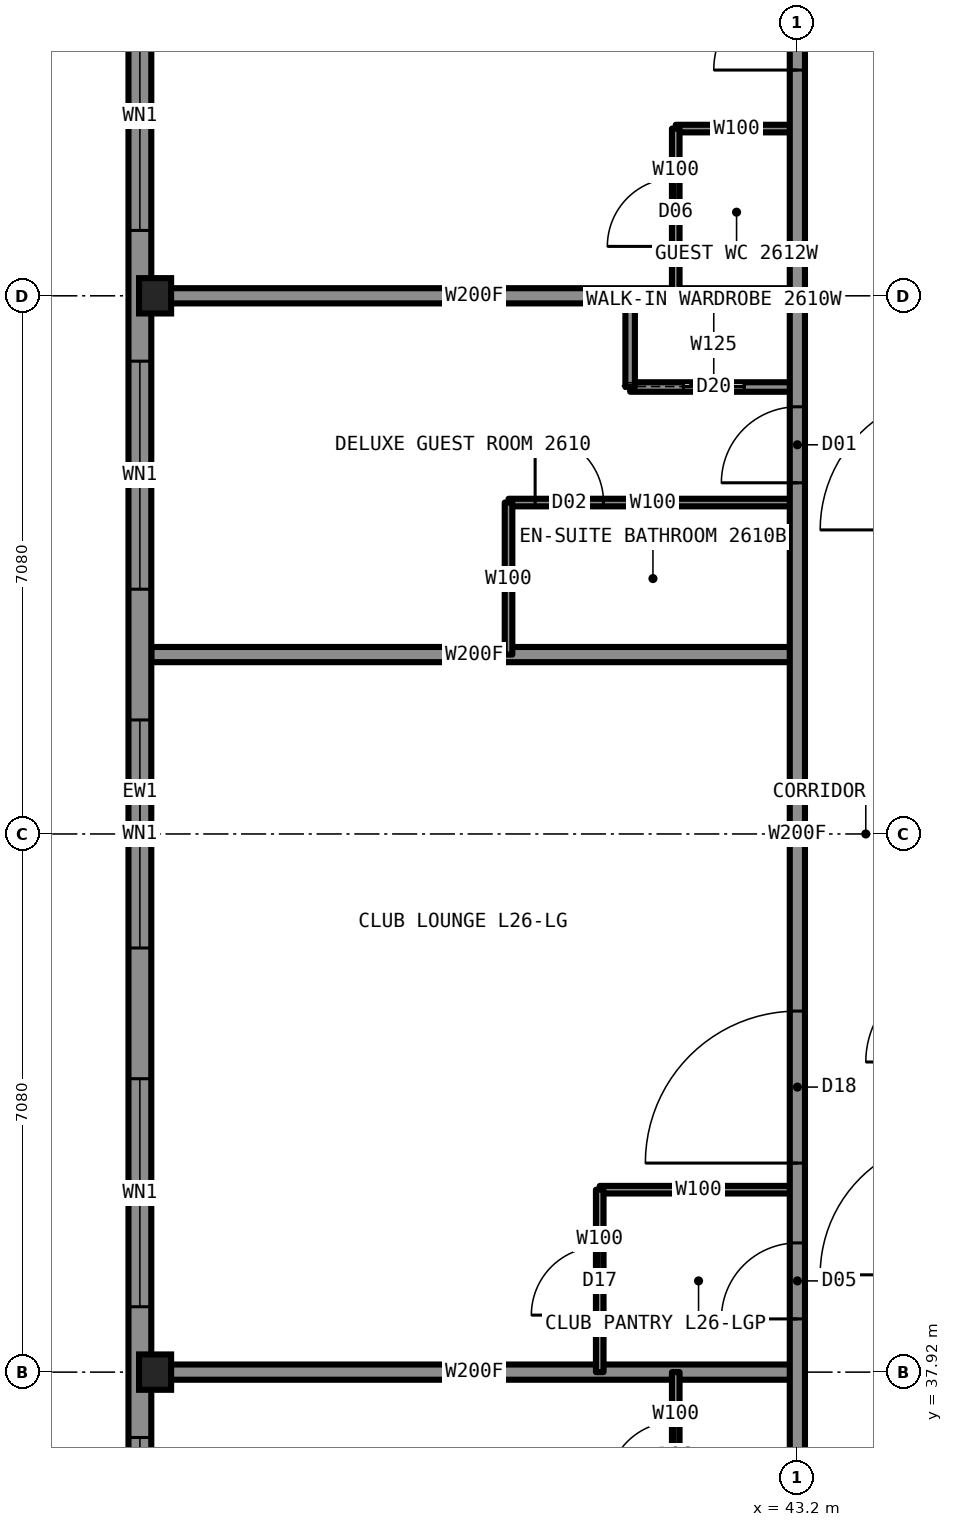
"""IFC4 building model, lengths in metres.
Left out: names, types, materials, properties, quantities, classifications, styles, units other than length and angle.
Written with IfcOpenShell. Run it as: python <this file> out.ifc"""

import sys

from ifc_helpers import new_model, si_unit, direction, frame, frame_2d, origin, origin_2d, place, context, subcontext, project, spatial, rectangle, i_section, extrude, element, fill, save


model = new_model("IFC4")
c1 = context("Model", 3, precision=1e-05, world=origin(), true_north=direction((0.0, 1.0)))
c2 = subcontext(c1, "Body", "Model", "MODEL_VIEW")
j1 = project(units=[si_unit("LENGTHUNIT", "METRE"), si_unit("PLANEANGLEUNIT", "RADIAN")], contexts=[c1])
p1 = place(None, origin())
s1 = spatial("IfcSite", under=j1, at=p1, CompositionType="ELEMENT")
p2 = place(p1, origin())
s2 = spatial("IfcBuilding", under=s1, at=p2, CompositionType="ELEMENT")
p3 = place(p2, frame((0.0, 0.0, 93.4)))
s3 = spatial("IfcBuildingStorey", under=s2, at=p3, CompositionType="ELEMENT", Elevation=93.4)
for number, where, z_axis, x_axis in (
    (1, (34.75, 37.92, 0.0), (0.0, 0.0, 1.0), (1.0, 0.0, 0.0)),
    (2, (34.75, 52.08, 0.0), (0.0, 0.0, 1.0), (1.0, 0.0, 0.0)),
):
    element("IfcColumn", number, at=place(p3, frame(where, z_axis=z_axis, x_axis=x_axis)), inside=s3, PredefinedType="COLUMN", context=c2, shape_type="SweptSolid", body=[
        extrude(i_section(OverallWidth=0.442, OverallDepth=0.531, WebThickness=0.066, FlangeThickness=0.106, at=origin_2d()), origin(), (0.0, 0.0, 1.0), 3.5),
    ])
p4 = place(p3, frame((40.6, 40.32, 0.0), z_axis=(0.0, 0.0, 1.0), x_axis=(1.0, 0.0, 0.0)))
e3 = element("IfcWall", 3, at=p4, inside=s3, PredefinedType="PARTITIONING", context=c2, shape_type="SweptSolid", body=[
    extrude(rectangle(XDim=2.6, YDim=0.1, at=frame_2d((1.3, 0.0))), origin(), (0.0, 0.0, 1.0), 2.731),
])
p5 = place(p3, frame((34.7, 37.92, 0.0), z_axis=(0.0, 0.0, 1.0), x_axis=(1.0, 0.0, 0.0)))
e4 = element("IfcWall", 4, at=p5, inside=s3, PredefinedType="PARTITIONING", context=c2, shape_type="SweptSolid", body=[
    extrude(rectangle(XDim=8.5, YDim=0.2, at=frame_2d((4.25, 0.0))), origin(), (0.0, 0.0, 1.0), 2.573),
])
p6 = place(p3, frame((34.7, 47.36, 0.0), z_axis=(0.0, 0.0, 1.0), x_axis=(1.0, 0.0, 0.0)))
e5 = element("IfcWall", 5, at=p6, inside=s3, PredefinedType="PARTITIONING", context=c2, shape_type="SweptSolid", body=[
    extrude(rectangle(XDim=8.5, YDim=0.2, at=frame_2d((4.25, 0.0))), origin(), (0.0, 0.0, 1.0), 2.731),
])
p7 = place(p3, frame((39.4, 49.36, 0.0), z_axis=(0.0, 0.0, 1.0), x_axis=(1.0, 0.0, 0.0)))
e6 = element("IfcWall", 6, at=p7, inside=s3, PredefinedType="PARTITIONING", context=c2, shape_type="SweptSolid", body=[
    extrude(rectangle(XDim=3.8, YDim=0.1, at=frame_2d((1.9, 0.0))), origin(), (0.0, 0.0, 1.0), 3.33),
])
p8 = place(p7, frame((0.35, 0.0, 0.0)))
e7 = element("IfcOpeningElement", 7, at=p8, cuts=e6, PredefinedType="OPENING", context=c2, shape_type="SweptSolid", body=[
    extrude(rectangle(XDim=0.9, YDim=2.1, at=frame_2d((0.45, 1.05))), frame((0.0, 0.06, 0.0), z_axis=(0.0, -1.0, 0.0), x_axis=(1.0, 0.0, 0.0)), (0.0, 0.0, 1.0), 0.12),
])
p9 = place(p3, frame((41.0, 50.88, 0.0), z_axis=(0.0, 0.0, 1.0), x_axis=(1.0, 0.0, 0.0)))
e8 = element("IfcWall", 8, at=p9, inside=s3, PredefinedType="PARTITIONING", context=c2, shape_type="SweptSolid", body=[
    extrude(rectangle(XDim=2.2, YDim=0.125, at=frame_2d((1.1, 0.0))), origin(), (0.0, 0.0, 1.0), 3.33),
])
p10 = place(p9, frame((0.7, 0.0, 0.0)))
e9 = element("IfcOpeningElement", 9, at=p10, cuts=e8, PredefinedType="OPENING", context=c2, shape_type="SweptSolid", body=[
    extrude(rectangle(XDim=0.8, YDim=2.1, at=frame_2d((0.4, 1.05))), frame((0.0, 0.073, 0.0), z_axis=(0.0, -1.0, 0.0), x_axis=(1.0, 0.0, 0.0)), (0.0, 0.0, 1.0), 0.145),
])
p11 = place(p3, frame((34.7, 52.08, 0.0), z_axis=(0.0, 0.0, 1.0), x_axis=(1.0, 0.0, 0.0)))
e10 = element("IfcWall", 10, at=p11, inside=s3, PredefinedType="PARTITIONING", context=c2, shape_type="SweptSolid", body=[
    extrude(rectangle(XDim=8.5, YDim=0.2, at=frame_2d((4.25, 0.0))), origin(), (0.0, 0.0, 1.0), 2.573),
])
p12 = place(p3, frame((41.6, 54.28, 0.0), z_axis=(0.0, 0.0, 1.0), x_axis=(1.0, 0.0, 0.0)))
e11 = element("IfcWall", 11, at=p12, inside=s3, PredefinedType="PARTITIONING", context=c2, shape_type="SweptSolid", body=[
    extrude(rectangle(XDim=1.6, YDim=0.1, at=frame_2d((0.8, 0.0))), origin(), (0.0, 0.0, 1.0), 3.33),
])
p13 = place(p3, frame((43.2, 33.22, 0.0), z_axis=(0.0, 0.0, 1.0), x_axis=(0.0, 1.0, 0.0)))
e12 = element("IfcWall", 12, at=p13, inside=s3, PredefinedType="PARTITIONING", context=c2, shape_type="SweptSolid", body=[
    extrude(rectangle(XDim=23.56, YDim=0.2, at=frame_2d((11.78, 0.0))), origin(), (0.0, 0.0, 1.0), 3.33),
])
p14 = place(p13, frame((16.4, 0.0, 0.0)))
e13 = element("IfcOpeningElement", 13, at=p14, cuts=e12, PredefinedType="OPENING", context=c2, shape_type="SweptSolid", body=[
    extrude(rectangle(XDim=1.0, YDim=2.2, at=frame_2d((0.5, 1.1))), frame((0.0, 0.11, 0.0), z_axis=(0.0, -1.0, 0.0), x_axis=(1.0, 0.0, 0.0)), (0.0, 0.0, 1.0), 0.22),
])
p15 = place(p13, frame((21.83, 0.0, 0.0)))
e14 = element("IfcOpeningElement", 14, at=p15, cuts=e12, PredefinedType="OPENING", context=c2, shape_type="SweptSolid", body=[
    extrude(rectangle(XDim=1.1, YDim=2.2, at=frame_2d((0.55, 1.1))), frame((0.0, 0.11, 0.0), z_axis=(0.0, -1.0, 0.0), x_axis=(1.0, 0.0, 0.0)), (0.0, 0.0, 1.0), 0.22),
])
p16 = place(p13, frame((0.63, 0.0, 0.0)))
e15 = element("IfcOpeningElement", 15, at=p16, cuts=e12, PredefinedType="OPENING", context=c2, shape_type="SweptSolid", body=[
    extrude(rectangle(XDim=1.1, YDim=2.2, at=frame_2d((0.55, 1.1))), frame((0.0, 0.11, 0.0), z_axis=(0.0, -1.0, 0.0), x_axis=(1.0, 0.0, 0.0)), (0.0, 0.0, 1.0), 0.22),
])
p17 = place(p13, frame((7.45, 0.0, 0.0)))
e16 = element("IfcOpeningElement", 16, at=p17, cuts=e12, PredefinedType="OPENING", context=c2, shape_type="SweptSolid", body=[
    extrude(rectangle(XDim=2.0, YDim=2.4, at=frame_2d((1.0, 1.2))), frame((0.0, 0.11, 0.0), z_axis=(0.0, -1.0, 0.0), x_axis=(1.0, 0.0, 0.0)), (0.0, 0.0, 1.0), 0.22),
])
p18 = place(p13, frame((5.4, 0.0, 0.0)))
e17 = element("IfcOpeningElement", 17, at=p18, cuts=e12, PredefinedType="OPENING", context=c2, shape_type="SweptSolid", body=[
    extrude(rectangle(XDim=1.0, YDim=2.1, at=frame_2d((0.5, 1.05))), frame((0.0, 0.11, 0.0), z_axis=(0.0, -1.0, 0.0), x_axis=(1.0, 0.0, 0.0)), (0.0, 0.0, 1.0), 0.22),
])
p19 = place(p3, frame((41.6, 35.72, 0.0), z_axis=(0.0, 0.0, 1.0), x_axis=(0.0, 1.0, 0.0)))
e18 = element("IfcWall", 18, at=p19, inside=s3, PredefinedType="PARTITIONING", context=c2, shape_type="SweptSolid", body=[
    extrude(rectangle(XDim=2.2, YDim=0.1, at=frame_2d((1.1, 0.0))), origin(), (0.0, 0.0, 1.0), 3.33),
])
p20 = place(p19, frame((0.65, 0.0, 0.0)))
e19 = element("IfcOpeningElement", 19, at=p20, cuts=e18, PredefinedType="OPENING", context=c2, shape_type="SweptSolid", body=[
    extrude(rectangle(XDim=0.9, YDim=2.1, at=frame_2d((0.45, 1.05))), frame((0.0, 0.06, 0.0), z_axis=(0.0, -1.0, 0.0), x_axis=(1.0, 0.0, 0.0)), (0.0, 0.0, 1.0), 0.12),
])
p21 = place(p3, frame((41.6, 52.08, 0.0), z_axis=(0.0, 0.0, 1.0), x_axis=(0.0, 1.0, 0.0)))
e20 = element("IfcWall", 20, at=p21, inside=s3, PredefinedType="PARTITIONING", context=c2, shape_type="SweptSolid", body=[
    extrude(rectangle(XDim=2.2, YDim=0.1, at=frame_2d((1.1, 0.0))), origin(), (0.0, 0.0, 1.0), 3.33),
])
p22 = place(p21, frame((0.65, 0.0, 0.0)))
e21 = element("IfcOpeningElement", 21, at=p22, cuts=e20, PredefinedType="OPENING", context=c2, shape_type="SweptSolid", body=[
    extrude(rectangle(XDim=0.9, YDim=2.1, at=frame_2d((0.45, 1.05))), frame((0.0, 0.06, 0.0), z_axis=(0.0, -1.0, 0.0), x_axis=(1.0, 0.0, 0.0)), (0.0, 0.0, 1.0), 0.12),
])
p23 = place(p3, frame((41.0, 50.88, 0.0), z_axis=(0.0, 0.0, 1.0), x_axis=(0.0, 1.0, 0.0)))
e22 = element("IfcWall", 22, at=p23, inside=s3, PredefinedType="PARTITIONING", context=c2, shape_type="SweptSolid", body=[
    extrude(rectangle(XDim=1.2, YDim=0.125, at=frame_2d((0.6, 0.0))), origin(), (0.0, 0.0, 1.0), 3.33),
])
p24 = place(p3, frame((40.6, 37.92, 0.0), z_axis=(0.0, 0.0, 1.0), x_axis=(0.0, 1.0, 0.0)))
e23 = element("IfcWall", 23, at=p24, inside=s3, PredefinedType="PARTITIONING", context=c2, shape_type="SweptSolid", body=[
    extrude(rectangle(XDim=2.4, YDim=0.1, at=frame_2d((1.2, 0.0))), origin(), (0.0, 0.0, 1.0), 3.33),
])
p25 = place(p24, frame((0.75, 0.0, 0.0)))
e24 = element("IfcOpeningElement", 24, at=p25, cuts=e23, PredefinedType="OPENING", context=c2, shape_type="SweptSolid", body=[
    extrude(rectangle(XDim=0.9, YDim=2.2, at=frame_2d((0.45, 1.1))), frame((0.0, 0.06, 0.0), z_axis=(0.0, -1.0, 0.0), x_axis=(1.0, 0.0, 0.0)), (0.0, 0.0, 1.0), 0.12),
])
p26 = place(p3, frame((39.4, 47.36, 0.0), z_axis=(0.0, 0.0, 1.0), x_axis=(0.0, 1.0, 0.0)))
e25 = element("IfcWall", 25, at=p26, inside=s3, PredefinedType="PARTITIONING", context=c2, shape_type="SweptSolid", body=[
    extrude(rectangle(XDim=2.0, YDim=0.1, at=frame_2d((1.0, 0.0))), origin(), (0.0, 0.0, 1.0), 3.33),
])
p27 = place(p3, frame((34.55, 60.1, 0.0), z_axis=(0.0, 0.0, 1.0), x_axis=(0.0, -1.0, 0.0)))
e26 = element("IfcWall", 26, at=p27, inside=s3, PredefinedType="SOLIDWALL", context=c2, shape_type="SweptSolid", body=[
    extrude(rectangle(XDim=30.2, YDim=0.3, at=frame_2d((15.1, 0.0))), origin(), (0.0, 0.0, 1.0), 2.83),
])
p28 = place(p27, frame((0.85, 0.0, 0.5)))
e27 = element("IfcOpeningElement", 27, at=p28, cuts=e26, PredefinedType="OPENING", context=c2, shape_type="SweptSolid", body=[
    extrude(rectangle(XDim=1.6, YDim=2.0, at=frame_2d((0.8, 1.0))), frame((0.0, 0.16, 0.0), z_axis=(0.0, -1.0, 0.0), x_axis=(1.0, 0.0, 0.0)), (0.0, 0.0, 1.0), 0.32),
])
p29 = place(p27, frame((4.16, 0.0, 0.5)))
e28 = element("IfcOpeningElement", 28, at=p29, cuts=e26, PredefinedType="OPENING", context=c2, shape_type="SweptSolid", body=[
    extrude(rectangle(XDim=3.0, YDim=2.0, at=frame_2d((1.5, 1.0))), frame((0.0, 0.16, 0.0), z_axis=(0.0, -1.0, 0.0), x_axis=(1.0, 0.0, 0.0)), (0.0, 0.0, 1.0), 0.32),
])
p30 = place(p27, frame((8.88, 0.0, 0.5)))
e29 = element("IfcOpeningElement", 29, at=p30, cuts=e26, PredefinedType="OPENING", context=c2, shape_type="SweptSolid", body=[
    extrude(rectangle(XDim=3.0, YDim=2.0, at=frame_2d((1.5, 1.0))), frame((0.0, 0.16, 0.0), z_axis=(0.0, -1.0, 0.0), x_axis=(1.0, 0.0, 0.0)), (0.0, 0.0, 1.0), 0.32),
])
p31 = place(p27, frame((13.6, 0.0, 0.5)))
e30 = element("IfcOpeningElement", 30, at=p31, cuts=e26, PredefinedType="OPENING", context=c2, shape_type="SweptSolid", body=[
    extrude(rectangle(XDim=3.0, YDim=2.0, at=frame_2d((1.5, 1.0))), frame((0.0, 0.16, 0.0), z_axis=(0.0, -1.0, 0.0), x_axis=(1.0, 0.0, 0.0)), (0.0, 0.0, 1.0), 0.32),
])
p32 = place(p27, frame((18.32, 0.0, 0.5)))
e31 = element("IfcOpeningElement", 31, at=p32, cuts=e26, PredefinedType="OPENING", context=c2, shape_type="SweptSolid", body=[
    extrude(rectangle(XDim=3.0, YDim=2.0, at=frame_2d((1.5, 1.0))), frame((0.0, 0.16, 0.0), z_axis=(0.0, -1.0, 0.0), x_axis=(1.0, 0.0, 0.0)), (0.0, 0.0, 1.0), 0.32),
])
p33 = place(p27, frame((23.04, 0.0, 0.5)))
e32 = element("IfcOpeningElement", 32, at=p33, cuts=e26, PredefinedType="OPENING", context=c2, shape_type="SweptSolid", body=[
    extrude(rectangle(XDim=3.0, YDim=2.0, at=frame_2d((1.5, 1.0))), frame((0.0, 0.16, 0.0), z_axis=(0.0, -1.0, 0.0), x_axis=(1.0, 0.0, 0.0)), (0.0, 0.0, 1.0), 0.32),
])
p34 = place(p27, frame((27.75, 0.0, 0.5)))
e33 = element("IfcOpeningElement", 33, at=p34, cuts=e26, PredefinedType="OPENING", context=c2, shape_type="SweptSolid", body=[
    extrude(rectangle(XDim=1.6, YDim=2.0, at=frame_2d((0.8, 1.0))), frame((0.0, 0.16, 0.0), z_axis=(0.0, -1.0, 0.0), x_axis=(1.0, 0.0, 0.0)), (0.0, 0.0, 1.0), 0.32),
])
p35 = place(p14, origin())
e34 = element("IfcDoor", 34, at=p35, inside=s3, OperationType="SINGLE_SWING_LEFT", PredefinedType="DOOR", context=c2, shape_type="SweptSolid", body=[
    extrude(rectangle(XDim=1.0, YDim=2.2, at=frame_2d((0.5, 1.1))), frame((0.0, 0.025, 0.0), z_axis=(0.0, -1.0, 0.0), x_axis=(1.0, 0.0, 0.0)), (0.0, 0.0, 1.0), 0.05),
])
fill(e13, e34)
p36 = place(p8, origin())
e35 = element("IfcDoor", 35, at=p36, inside=s3, OperationType="SINGLE_SWING_RIGHT", PredefinedType="DOOR", context=c2, shape_type="SweptSolid", body=[
    extrude(rectangle(XDim=0.9, YDim=2.1, at=frame_2d((0.45, 1.05))), frame((0.0, 0.025, 0.0), z_axis=(0.0, -1.0, 0.0), x_axis=(1.0, 0.0, 0.0)), (0.0, 0.0, 1.0), 0.05),
])
fill(e7, e35)
p37 = place(p10, origin())
e36 = element("IfcDoor", 36, at=p37, inside=s3, OperationType="SLIDING_TO_LEFT", PredefinedType="DOOR", context=c2, shape_type="SweptSolid", body=[
    extrude(rectangle(XDim=0.8, YDim=2.1, at=frame_2d((0.4, 1.05))), frame((0.0, 0.025, 0.0), z_axis=(0.0, -1.0, 0.0), x_axis=(1.0, 0.0, 0.0)), (0.0, 0.0, 1.0), 0.05),
])
fill(e9, e36)
p38 = place(p15, origin())
e37 = element("IfcDoor", 37, at=p38, inside=s3, OperationType="SINGLE_SWING_LEFT", PredefinedType="DOOR", context=c2, shape_type="SweptSolid", body=[
    extrude(rectangle(XDim=1.1, YDim=2.2, at=frame_2d((0.55, 1.1))), frame((0.0, 0.025, 0.0), z_axis=(0.0, -1.0, 0.0), x_axis=(1.0, 0.0, 0.0)), (0.0, 0.0, 1.0), 0.05),
])
fill(e14, e37)
p39 = place(p22, origin())
e38 = element("IfcDoor", 38, at=p39, inside=s3, OperationType="SINGLE_SWING_LEFT", PredefinedType="DOOR", context=c2, shape_type="SweptSolid", body=[
    extrude(rectangle(XDim=0.9, YDim=2.1, at=frame_2d((0.45, 1.05))), frame((0.0, 0.025, 0.0), z_axis=(0.0, -1.0, 0.0), x_axis=(1.0, 0.0, 0.0)), (0.0, 0.0, 1.0), 0.05),
])
fill(e21, e38)
p40 = place(p20, origin())
e39 = element("IfcDoor", 39, at=p40, inside=s3, OperationType="SINGLE_SWING_LEFT", PredefinedType="DOOR", context=c2, shape_type="SweptSolid", body=[
    extrude(rectangle(XDim=0.9, YDim=2.1, at=frame_2d((0.45, 1.05))), frame((0.0, 0.025, 0.0), z_axis=(0.0, -1.0, 0.0), x_axis=(1.0, 0.0, 0.0)), (0.0, 0.0, 1.0), 0.05),
])
fill(e19, e39)
p41 = place(p17, origin())
e40 = element("IfcDoor", 40, at=p41, inside=s3, OperationType="DOUBLE_DOOR_SINGLE_SWING", PredefinedType="DOOR", context=c2, shape_type="SweptSolid", body=[
    extrude(rectangle(XDim=2.0, YDim=2.4, at=frame_2d((1.0, 1.2))), frame((0.0, 0.025, 0.0), z_axis=(0.0, -1.0, 0.0), x_axis=(1.0, 0.0, 0.0)), (0.0, 0.0, 1.0), 0.05),
])
fill(e16, e40)
p42 = place(p25, origin())
e41 = element("IfcDoor", 41, at=p42, inside=s3, OperationType="SINGLE_SWING_LEFT", PredefinedType="DOOR", context=c2, shape_type="SweptSolid", body=[
    extrude(rectangle(XDim=0.9, YDim=2.2, at=frame_2d((0.45, 1.1))), frame((0.0, 0.025, 0.0), z_axis=(0.0, -1.0, 0.0), x_axis=(1.0, 0.0, 0.0)), (0.0, 0.0, 1.0), 0.05),
])
fill(e24, e41)
p43 = place(p18, origin())
e42 = element("IfcDoor", 42, at=p43, inside=s3, OperationType="SINGLE_SWING_LEFT", PredefinedType="DOOR", context=c2, shape_type="SweptSolid", body=[
    extrude(rectangle(XDim=1.0, YDim=2.1, at=frame_2d((0.5, 1.05))), frame((0.0, 0.025, 0.0), z_axis=(0.0, -1.0, 0.0), x_axis=(1.0, 0.0, 0.0)), (0.0, 0.0, 1.0), 0.05),
])
fill(e17, e42)
p44 = place(p29, origin())
e43 = element("IfcWindow", 43, at=p44, inside=s3, PartitioningType="SINGLE_PANEL", PredefinedType="WINDOW", context=c2, shape_type="SweptSolid", body=[
    extrude(rectangle(XDim=3.0, YDim=2.0, at=frame_2d((1.5, 1.0))), frame((0.0, 0.03, 0.0), z_axis=(0.0, -1.0, 0.0), x_axis=(1.0, 0.0, 0.0)), (0.0, 0.0, 1.0), 0.06),
])
fill(e28, e43)
p45 = place(p30, origin())
e44 = element("IfcWindow", 44, at=p45, inside=s3, PartitioningType="SINGLE_PANEL", PredefinedType="WINDOW", context=c2, shape_type="SweptSolid", body=[
    extrude(rectangle(XDim=3.0, YDim=2.0, at=frame_2d((1.5, 1.0))), frame((0.0, 0.03, 0.0), z_axis=(0.0, -1.0, 0.0), x_axis=(1.0, 0.0, 0.0)), (0.0, 0.0, 1.0), 0.06),
])
fill(e29, e44)
p46 = place(p31, origin())
e45 = element("IfcWindow", 45, at=p46, inside=s3, PartitioningType="SINGLE_PANEL", PredefinedType="WINDOW", context=c2, shape_type="SweptSolid", body=[
    extrude(rectangle(XDim=3.0, YDim=2.0, at=frame_2d((1.5, 1.0))), frame((0.0, 0.03, 0.0), z_axis=(0.0, -1.0, 0.0), x_axis=(1.0, 0.0, 0.0)), (0.0, 0.0, 1.0), 0.06),
])
fill(e30, e45)
p47 = place(p32, origin())
e46 = element("IfcWindow", 46, at=p47, inside=s3, PartitioningType="SINGLE_PANEL", PredefinedType="WINDOW", context=c2, shape_type="SweptSolid", body=[
    extrude(rectangle(XDim=3.0, YDim=2.0, at=frame_2d((1.5, 1.0))), frame((0.0, 0.03, 0.0), z_axis=(0.0, -1.0, 0.0), x_axis=(1.0, 0.0, 0.0)), (0.0, 0.0, 1.0), 0.06),
])
fill(e31, e46)
p48 = place(p33, origin())
e47 = element("IfcWindow", 47, at=p48, inside=s3, PartitioningType="SINGLE_PANEL", PredefinedType="WINDOW", context=c2, shape_type="SweptSolid", body=[
    extrude(rectangle(XDim=3.0, YDim=2.0, at=frame_2d((1.5, 1.0))), frame((0.0, 0.03, 0.0), z_axis=(0.0, -1.0, 0.0), x_axis=(1.0, 0.0, 0.0)), (0.0, 0.0, 1.0), 0.06),
])
fill(e32, e47)
save(model, sys.argv[1])
